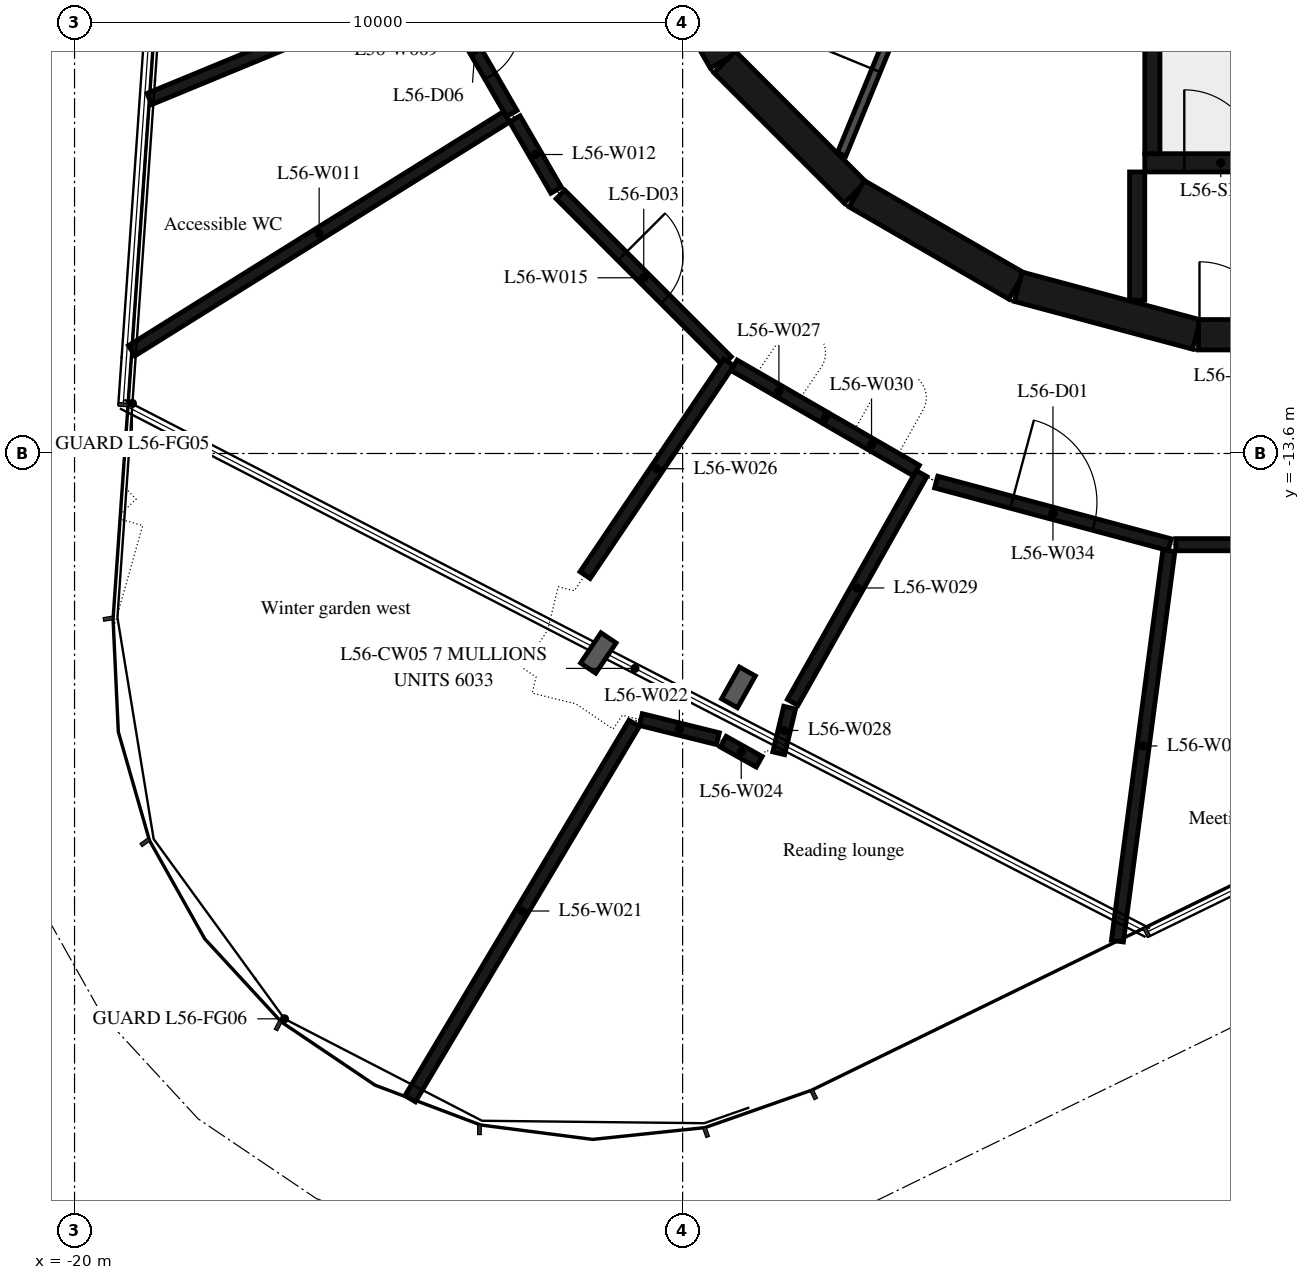
"""IFC4 building model, lengths in metres.
Left out: names, types, materials, properties, quantities, classifications, styles, units other than length and angle.
Written with IfcOpenShell. Run it as: python <this file> out.ifc"""

import sys

from ifc_helpers import new_model, si_unit, direction, frame, frame_2d, origin, place, context, subcontext, project, spatial, rectangle, extrude, element, fill, save


model = new_model("IFC4")
c1 = context("Model", 3, precision=1e-05, world=origin(), true_north=direction((0.0, 1.0)))
c2 = subcontext(c1, "Body", "Model", "MODEL_VIEW")
j1 = project(units=[si_unit("LENGTHUNIT", "METRE"), si_unit("PLANEANGLEUNIT", "RADIAN")], contexts=[c1])
p1 = place(None, origin())
s1 = spatial("IfcSite", under=j1, at=p1, CompositionType="ELEMENT")
p2 = place(p1, origin())
s2 = spatial("IfcBuilding", under=s1, at=p2, CompositionType="ELEMENT")
p3 = place(p2, frame((0.0, 0.0, 219.9)))
s3 = spatial("IfcBuildingStorey", under=s2, at=p3, CompositionType="ELEMENT", Elevation=219.9)
p4 = place(p3, frame((-10.845, -4.51, 0.0), z_axis=(0.0, 0.0, 1.0), x_axis=(0.500087131594, -0.865975092491, 0.0)))
e1 = element("IfcWall", 1, at=p4, inside=s3, PredefinedType="SHEAR", context=c2, shape_type="SweptSolid", body=[
    extrude(rectangle(XDim=3.033, YDim=0.5, at=frame_2d((1.516, 0.0))), origin(), (0.0, 0.0, 1.0), 6.35),
])
p5 = place(p3, frame((-9.308, -7.164, 0.0), z_axis=(0.0, 0.0, 1.0), x_axis=(0.707106781187, -0.707106781187, 0.0)))
e2 = element("IfcWall", 2, at=p5, inside=s3, PredefinedType="SHEAR", context=c2, shape_type="SweptSolid", body=[
    extrude(rectangle(XDim=3.032, YDim=0.5, at=frame_2d((1.516, 0.0))), origin(), (0.0, 0.0, 1.0), 6.35),
])
for number, where, z_axis, x_axis in (
    (3, (-7.137, -9.329, 0.0), (0.0, 0.0, 1.0), (0.866, -0.5, 0.0)),
    (4, (-4.479, -10.858, 0.0), (0.0, 0.0, 1.0), (0.966, -0.259, 0.0)),
):
    element("IfcWall", number, at=place(p3, frame(where, z_axis=z_axis, x_axis=x_axis)), inside=s3, PredefinedType="SHEAR", context=c2, shape_type="SweptSolid", body=[
        extrude(rectangle(XDim=3.033, YDim=0.5, at=frame_2d((1.516, 0.0))), origin(), (0.0, 0.0, 1.0), 6.35),
    ])
p6 = place(p3, frame((-1.516, -11.647, 0.0), z_axis=(0.0, 0.0, 1.0), x_axis=(1.0, 0.0, 0.0)))
e5 = element("IfcWall", 5, at=p6, inside=s3, PredefinedType="SHEAR", context=c2, shape_type="SweptSolid", body=[
    extrude(rectangle(XDim=3.033, YDim=0.5, at=frame_2d((1.516, 0.0))), origin(), (0.0, 0.0, 1.0), 6.35),
])
p7 = place(p6, frame((0.016, 0.0, 0.0)))
e6 = element("IfcOpeningElement", 6, at=p7, cuts=e5, PredefinedType="OPENING", context=c2, shape_type="SweptSolid", body=[
    extrude(rectangle(XDim=1.2, YDim=2.1, at=frame_2d((0.6, 1.05))), frame((0.0, 0.26, 0.0), z_axis=(0.0, -1.0, 0.0), x_axis=(1.0, 0.0, 0.0)), (0.0, 0.0, 1.0), 0.52),
])
p8 = place(p3, frame((-2.275, -8.67, 0.0), z_axis=(0.0, 0.0, 1.0), x_axis=(0.0, 1.0, 0.0)))
e7 = element("IfcWall", 7, at=p8, inside=s3, PredefinedType="SHEAR", context=c2, shape_type="SweptSolid", body=[
    extrude(rectangle(XDim=3.32, YDim=0.25, at=frame_2d((1.66, 0.0))), origin(), (0.0, 0.0, 1.0), 6.35),
])
p9 = place(p3, frame((-2.4, -8.82, 0.0), z_axis=(0.0, 0.0, 1.0), x_axis=(1.0, 0.0, 0.0)))
e8 = element("IfcWall", 8, at=p9, inside=s3, PredefinedType="SHEAR", context=c2, shape_type="SweptSolid", body=[
    extrude(rectangle(XDim=2.5, YDim=0.3, at=frame_2d((1.25, 0.0))), origin(), (0.0, 0.0, 1.0), 6.35),
])
p10 = place(p9, frame((0.65, 0.0, 0.0)))
e9 = element("IfcOpeningElement", 9, at=p10, cuts=e8, PredefinedType="OPENING", context=c2, shape_type="SweptSolid", body=[
    extrude(rectangle(XDim=1.2, YDim=2.1, at=frame_2d((0.6, 1.05))), frame((0.0, 0.16, 0.0), z_axis=(0.0, -1.0, 0.0), x_axis=(1.0, 0.0, 0.0)), (0.0, 0.0, 1.0), 0.32),
])
p11 = place(p3, frame((-2.525, -8.97, 0.0), z_axis=(0.0, 0.0, 1.0), x_axis=(0.0, -1.0, 0.0)))
e10 = element("IfcWall", 10, at=p11, inside=s3, PredefinedType="SHEAR", context=c2, shape_type="SweptSolid", body=[
    extrude(rectangle(XDim=2.11, YDim=0.25, at=frame_2d((1.055, 0.0))), origin(), (0.0, 0.0, 1.0), 6.35),
])
p12 = place(p3, frame((-7.385, -8.681, 0.0), z_axis=(0.0, 0.0, 1.0), x_axis=(0.379804590409, 0.925066739811, 0.0)))
e11 = element("IfcWall", 11, at=p12, inside=s3, PredefinedType="PARTITIONING", context=c2, shape_type="SweptSolid", body=[
    extrude(rectangle(XDim=3.885, YDim=0.15, at=frame_2d((1.942, 0.0))), origin(), (0.0, 0.0, 1.0), 6.35),
])
p13 = place(p12, frame((1.493, 0.0, 0.0)))
e12 = element("IfcOpeningElement", 12, at=p13, cuts=e11, PredefinedType="OPENING", context=c2, shape_type="SweptSolid", body=[
    extrude(rectangle(XDim=0.9, YDim=2.1, at=frame_2d((0.45, 1.05))), frame((0.0, 0.085, 0.0), z_axis=(0.0, -1.0, 0.0), x_axis=(1.0, 0.0, 0.0)), (0.0, 0.0, 1.0), 0.17),
])
p14 = place(p3, frame((-14.162, -5.868, 0.0), z_axis=(0.0, 0.0, 1.0), x_axis=(-0.924354193641, -0.381535482883, 0.0)))
e13 = element("IfcWall", 13, at=p14, inside=s3, PredefinedType="PARTITIONING", context=c2, shape_type="SweptSolid", body=[
    extrude(rectangle(XDim=4.985, YDim=0.2, at=frame_2d((2.492, 0.0))), origin(), (0.0, 0.0, 1.0), 6.35),
])
p15 = place(p3, frame((-14.02, -5.917, 0.0), z_axis=(0.0, 0.0, 1.0), x_axis=(0.500395345151, -0.865797030805, 0.0)))
e14 = element("IfcWall", 14, at=p15, inside=s3, PredefinedType="PARTITIONING", context=c2, shape_type="SweptSolid", body=[
    extrude(rectangle(XDim=2.418, YDim=0.2, at=frame_2d((1.209, 0.0))), origin(), (0.0, 0.0, 1.0), 6.35),
])
p16 = place(p15, frame((0.709, 0.0, 0.0)))
e15 = element("IfcOpeningElement", 15, at=p16, cuts=e14, PredefinedType="OPENING", context=c2, shape_type="SweptSolid", body=[
    extrude(rectangle(XDim=1.0, YDim=2.1, at=frame_2d((0.5, 1.05))), frame((0.0, 0.11, 0.0), z_axis=(0.0, -1.0, 0.0), x_axis=(1.0, 0.0, 0.0)), (0.0, 0.0, 1.0), 0.22),
])
p17 = place(p3, frame((-12.895, -8.063, 0.0), z_axis=(0.0, 0.0, 1.0), x_axis=(-0.848392535646, -0.529367646782, 0.0)))
e16 = element("IfcWall", 16, at=p17, inside=s3, PredefinedType="PARTITIONING", context=c2, shape_type="SweptSolid", body=[
    extrude(rectangle(XDim=7.267, YDim=0.2, at=frame_2d((3.634, 0.0))), origin(), (0.0, 0.0, 1.0), 6.35),
])
p18 = place(p3, frame((-12.76, -8.096, 0.0), z_axis=(0.0, 0.0, 1.0), x_axis=(0.501171091484, -0.865348217229, 0.0)))
e17 = element("IfcWall", 17, at=p18, inside=s3, PredefinedType="PARTITIONING", context=c2, shape_type="SweptSolid", body=[
    extrude(rectangle(XDim=1.356, YDim=0.2, at=frame_2d((0.678, 0.0))), origin(), (0.0, 0.0, 1.0), 6.35),
])
p19 = place(p3, frame((-12.009, -9.341, 0.0), z_axis=(0.0, 0.0, 1.0), x_axis=(0.707106781187, -0.707106781187, 0.0)))
e18 = element("IfcWall", 18, at=p19, inside=s3, PredefinedType="PARTITIONING", context=c2, shape_type="SweptSolid", body=[
    extrude(rectangle(XDim=3.874, YDim=0.2, at=frame_2d((1.937, 0.0))), origin(), (0.0, 0.0, 1.0), 6.35),
])
p20 = place(p19, frame((1.437, 0.0, 0.0)))
e19 = element("IfcOpeningElement", 19, at=p20, cuts=e18, PredefinedType="OPENING", context=c2, shape_type="SweptSolid", body=[
    extrude(rectangle(XDim=1.0, YDim=2.1, at=frame_2d((0.5, 1.05))), frame((0.0, 0.11, 0.0), z_axis=(0.0, -1.0, 0.0), x_axis=(1.0, 0.0, 0.0)), (0.0, 0.0, 1.0), 0.22),
])
p21 = place(p3, frame((-10.797, -18.038, 0.0), z_axis=(0.0, 0.0, 1.0), x_axis=(-0.512471245072, -0.858704386255, 0.0)))
e20 = element("IfcWall", 20, at=p21, inside=s3, PredefinedType="PARTITIONING", context=c2, shape_type="SweptSolid", body=[
    extrude(rectangle(XDim=7.188, YDim=0.2, at=frame_2d((3.594, 0.0))), origin(), (0.0, 0.0, 1.0), 6.35),
])
p22 = place(p3, frame((-10.687, -17.976, 0.0), z_axis=(0.0, 0.0, 1.0), x_axis=(0.970569917961, -0.240819505747, 0.0)))
e21 = element("IfcWall", 21, at=p22, inside=s3, PredefinedType="PARTITIONING", context=c2, shape_type="SweptSolid", body=[
    extrude(rectangle(XDim=1.306, YDim=0.2, at=frame_2d((0.653, 0.0))), origin(), (0.0, 0.0, 1.0), 6.35),
])
p23 = place(p3, frame((-9.333, -18.339, 0.0), z_axis=(0.0, 0.0, 1.0), x_axis=(0.873069556201, -0.487595682953, 0.0)))
e22 = element("IfcWall", 22, at=p23, inside=s3, PredefinedType="PARTITIONING", context=c2, shape_type="SweptSolid", body=[
    extrude(rectangle(XDim=0.679, YDim=0.2, at=frame_2d((0.339, 0.0))), origin(), (0.0, 0.0, 1.0), 6.35),
])
p24 = place(p3, frame((-9.24, -12.1, 0.0), z_axis=(0.0, 0.0, 1.0), x_axis=(-0.559771610151, -0.828646935956, 0.0)))
e23 = element("IfcWall", 23, at=p24, inside=s3, PredefinedType="PARTITIONING", context=c2, shape_type="SweptSolid", body=[
    extrude(rectangle(XDim=4.224, YDim=0.2, at=frame_2d((2.112, 0.0))), origin(), (0.0, 0.0, 1.0), 6.35),
])
p25 = place(p3, frame((-9.153, -12.15, 0.0), z_axis=(0.0, 0.0, 1.0), x_axis=(0.866168859652, -0.49975144479, 0.0)))
e24 = element("IfcWall", 24, at=p25, inside=s3, PredefinedType="PARTITIONING", context=c2, shape_type="SweptSolid", body=[
    extrude(rectangle(XDim=1.701, YDim=0.2, at=frame_2d((0.851, 0.0))), origin(), (0.0, 0.0, 1.0), 6.35),
])
p26 = place(p3, frame((-8.42, -18.53, 0.0), z_axis=(0.0, 0.0, 1.0), x_axis=(0.233289147823, 0.972407411278, 0.0)))
e25 = element("IfcWall", 25, at=p26, inside=s3, PredefinedType="PARTITIONING", context=c2, shape_type="SweptSolid", body=[
    extrude(rectangle(XDim=0.771, YDim=0.2, at=frame_2d((0.386, 0.0))), origin(), (0.0, 0.0, 1.0), 6.35),
])
p27 = place(p3, frame((-8.191, -17.693, 0.0), z_axis=(0.0, 0.0, 1.0), x_axis=(0.490999025193, 0.871160121481, 0.0)))
e26 = element("IfcWall", 26, at=p27, inside=s3, PredefinedType="PARTITIONING", context=c2, shape_type="SweptSolid", body=[
    extrude(rectangle(XDim=4.319, YDim=0.2, at=frame_2d((2.16, 0.0))), origin(), (0.0, 0.0, 1.0), 6.35),
])
p28 = place(p3, frame((-7.63, -13.03, 0.0), z_axis=(0.0, 0.0, 1.0), x_axis=(0.866133007568, -0.499813578448, 0.0)))
e27 = element("IfcWall", 27, at=p28, inside=s3, PredefinedType="PARTITIONING", context=c2, shape_type="SweptSolid", body=[
    extrude(rectangle(XDim=1.701, YDim=0.2, at=frame_2d((0.851, 0.0))), origin(), (0.0, 0.0, 1.0), 6.35),
])
p29 = place(p3, frame((-5.83, -14.07, 0.0), z_axis=(0.0, 0.0, 1.0), x_axis=(0.965857829358, -0.259072679895, 0.0)))
e28 = element("IfcWall", 28, at=p29, inside=s3, PredefinedType="PARTITIONING", context=c2, shape_type="SweptSolid", body=[
    extrude(rectangle(XDim=3.976, YDim=0.2, at=frame_2d((1.988, 0.0))), origin(), (0.0, 0.0, 1.0), 6.35),
])
p30 = place(p29, frame((1.288, 0.0, 0.0)))
e29 = element("IfcOpeningElement", 29, at=p30, cuts=e28, PredefinedType="OPENING", context=c2, shape_type="SweptSolid", body=[
    extrude(rectangle(XDim=1.4, YDim=2.1, at=frame_2d((0.7, 1.05))), frame((0.0, 0.11, 0.0), z_axis=(0.0, -1.0, 0.0), x_axis=(1.0, 0.0, 0.0)), (0.0, 0.0, 1.0), 0.22),
])
p31 = place(p3, frame((-2.003, -15.199, 0.0), z_axis=(0.0, 0.0, 1.0), x_axis=(-0.130768496526, -0.991412931284, 0.0)))
e30 = element("IfcWall", 30, at=p31, inside=s3, PredefinedType="PARTITIONING", context=c2, shape_type="SweptSolid", body=[
    extrude(rectangle(XDim=6.477, YDim=0.2, at=frame_2d((3.238, 0.0))), origin(), (0.0, 0.0, 1.0), 6.35),
])
p32 = place(p3, frame((-1.89, -15.1, 0.0), z_axis=(0.0, 0.0, 1.0), x_axis=(1.0, 0.0, 0.0)))
e31 = element("IfcWall", 31, at=p32, inside=s3, PredefinedType="PARTITIONING", context=c2, shape_type="SweptSolid", body=[
    extrude(rectangle(XDim=3.88, YDim=0.2, at=frame_2d((1.94, 0.0))), origin(), (0.0, 0.0, 1.0), 6.35),
])
p33 = place(p32, frame((1.44, 0.0, 0.0)))
e32 = element("IfcOpeningElement", 32, at=p33, cuts=e31, PredefinedType="OPENING", context=c2, shape_type="SweptSolid", body=[
    extrude(rectangle(XDim=1.0, YDim=2.1, at=frame_2d((0.5, 1.05))), frame((0.0, 0.11, 0.0), z_axis=(0.0, -1.0, 0.0), x_axis=(1.0, 0.0, 0.0)), (0.0, 0.0, 1.0), 0.22),
])
p34 = place(p10, origin())
e33 = element("IfcDoor", 33, at=p34, inside=s3, OperationType="SINGLE_SWING_LEFT", PredefinedType="DOOR", context=c2, shape_type="SweptSolid", body=[
    extrude(rectangle(XDim=1.2, YDim=2.1, at=frame_2d((0.6, 1.05))), frame((0.0, 0.025, 0.0), z_axis=(0.0, -1.0, 0.0), x_axis=(1.0, 0.0, 0.0)), (0.0, 0.0, 1.0), 0.05),
])
fill(e9, e33)
p35 = place(p7, origin())
e34 = element("IfcDoor", 34, at=p35, inside=s3, OperationType="SINGLE_SWING_RIGHT", PredefinedType="DOOR", context=c2, shape_type="SweptSolid", body=[
    extrude(rectangle(XDim=1.2, YDim=2.1, at=frame_2d((0.6, 1.05))), frame((0.0, 0.025, 0.0), z_axis=(0.0, -1.0, 0.0), x_axis=(1.0, 0.0, 0.0)), (0.0, 0.0, 1.0), 0.05),
])
fill(e6, e34)
p36 = place(p13, origin())
e35 = element("IfcDoor", 35, at=p36, inside=s3, OperationType="SINGLE_SWING_RIGHT", PredefinedType="DOOR", context=c2, shape_type="SweptSolid", body=[
    extrude(rectangle(XDim=0.9, YDim=2.1, at=frame_2d((0.45, 1.05))), frame((0.0, 0.025, 0.0), z_axis=(0.0, -1.0, 0.0), x_axis=(1.0, 0.0, 0.0)), (0.0, 0.0, 1.0), 0.05),
])
fill(e12, e35)
p37 = place(p30, origin())
e36 = element("IfcDoor", 36, at=p37, inside=s3, OperationType="DOUBLE_DOOR_SINGLE_SWING", PredefinedType="DOOR", context=c2, shape_type="SweptSolid", body=[
    extrude(rectangle(XDim=1.4, YDim=2.1, at=frame_2d((0.7, 1.05))), frame((0.0, 0.025, 0.0), z_axis=(0.0, -1.0, 0.0), x_axis=(1.0, 0.0, 0.0)), (0.0, 0.0, 1.0), 0.05),
])
fill(e29, e36)
p38 = place(p20, origin())
e37 = element("IfcDoor", 37, at=p38, inside=s3, OperationType="SINGLE_SWING_LEFT", PredefinedType="DOOR", context=c2, shape_type="SweptSolid", body=[
    extrude(rectangle(XDim=1.0, YDim=2.1, at=frame_2d((0.5, 1.05))), frame((0.0, 0.025, 0.0), z_axis=(0.0, -1.0, 0.0), x_axis=(1.0, 0.0, 0.0)), (0.0, 0.0, 1.0), 0.05),
])
fill(e19, e37)
p39 = place(p16, origin())
e38 = element("IfcDoor", 38, at=p39, inside=s3, OperationType="SINGLE_SWING_LEFT", PredefinedType="DOOR", context=c2, shape_type="SweptSolid", body=[
    extrude(rectangle(XDim=1.0, YDim=2.1, at=frame_2d((0.5, 1.05))), frame((0.0, 0.025, 0.0), z_axis=(0.0, -1.0, 0.0), x_axis=(1.0, 0.0, 0.0)), (0.0, 0.0, 1.0), 0.05),
])
fill(e15, e38)
save(model, sys.argv[1])
